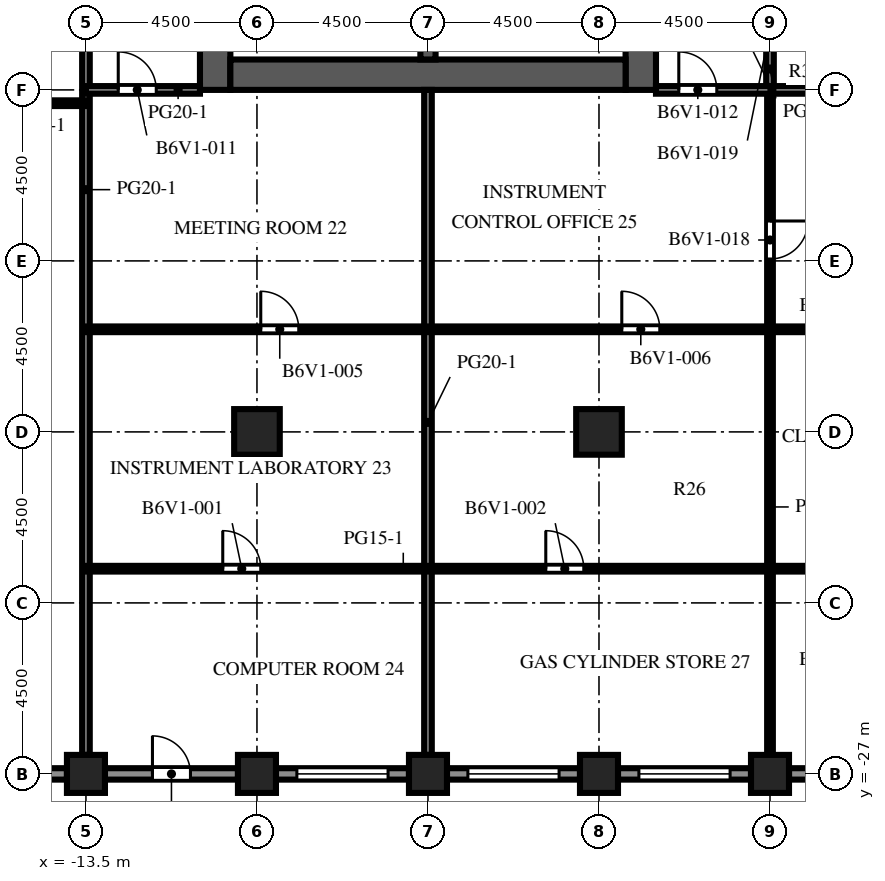
"""IFC4 building model, lengths in metres.
Left out: names, types, materials, properties, quantities, classifications, styles, units other than length and angle.
Written with IfcOpenShell. Run it as: python <this file> out.ifc"""

import sys

from ifc_helpers import new_model, si_unit, direction, frame, frame_2d, origin, origin_2d, place, context, subcontext, project, spatial, rectangle, extrude, element, fill, save


model = new_model("IFC4")
c1 = context("Model", 3, precision=1e-05, world=origin(), true_north=direction((0.0, 1.0)))
c2 = subcontext(c1, "Body", "Model", "MODEL_VIEW")
j1 = project(units=[si_unit("LENGTHUNIT", "METRE"), si_unit("PLANEANGLEUNIT", "RADIAN")], contexts=[c1])
p1 = place(None, origin())
s1 = spatial("IfcSite", under=j1, at=p1, CompositionType="ELEMENT")
p2 = place(p1, origin())
s2 = spatial("IfcBuilding", under=s1, at=p2, CompositionType="ELEMENT")
p3 = place(p2, frame((0.0, 0.0, 212.0)))
s3 = spatial("IfcBuildingStorey", under=s2, at=p3, CompositionType="ELEMENT", Elevation=212.0)
for number, where, z_axis, x_axis in (
    (1, (-13.5, -27.0, 0.0), (0.0, 0.0, 1.0), (1.0, 0.0, 0.0)),
    (2, (-9.0, -27.0, 0.0), (0.0, 0.0, 1.0), (1.0, 0.0, 0.0)),
    (3, (-4.5, -27.0, 0.0), (0.0, 0.0, 1.0), (1.0, 0.0, 0.0)),
    (4, (0.0, -27.0, 0.0), (0.0, 0.0, 1.0), (1.0, 0.0, 0.0)),
    (5, (4.5, -27.0, 0.0), (0.0, 0.0, 1.0), (1.0, 0.0, 0.0)),
):
    element("IfcColumn", number, at=place(p3, frame(where, z_axis=z_axis, x_axis=x_axis)), inside=s3, PredefinedType="COLUMN", context=c2, shape_type="SweptSolid", body=[
        extrude(rectangle(XDim=1.0, YDim=1.0, at=origin_2d()), origin(), (0.0, 0.0, 1.0), 4.1),
    ])
for number, where, z_axis, x_axis in (
    (6, (-9.0, -18.0, 0.0), (0.0, 0.0, 1.0), (1.0, 0.0, 0.0)),
    (7, (0.0, -18.0, 0.0), (0.0, 0.0, 1.0), (1.0, 0.0, 0.0)),
):
    element("IfcColumn", number, at=place(p3, frame(where, z_axis=z_axis, x_axis=x_axis)), inside=s3, PredefinedType="COLUMN", context=c2, shape_type="SweptSolid", body=[
        extrude(rectangle(XDim=1.2, YDim=1.2, at=origin_2d()), origin(), (0.0, 0.0, 1.0), 4.1),
    ])
p4 = place(p3, frame((-10.1, -9.0, 0.0), z_axis=(0.0, 0.0, 1.0), x_axis=(0.0, 1.0, 0.0)))
e8 = element("IfcWall", 8, at=p4, inside=s3, PredefinedType="SHEAR", context=c2, shape_type="SweptSolid", body=[
    extrude(rectangle(XDim=27.5, YDim=0.8, at=frame_2d((13.75, 0.0))), origin(), (0.0, 0.0, 1.0), 4.1),
])
p5 = place(p4, frame((12.55, 0.0, 0.0)))
e9 = element("IfcOpeningElement", 9, at=p5, cuts=e8, PredefinedType="OPENING", context=c2, shape_type="SweptSolid", body=[
    extrude(rectangle(XDim=2.4, YDim=2.4, at=frame_2d((1.2, 1.2))), frame((0.0, 0.41, 0.0), z_axis=(0.0, -1.0, 0.0), x_axis=(1.0, 0.0, 0.0)), (0.0, 0.0, 1.0), 0.82),
])
p6 = place(p4, frame((6.825, 0.0, 0.0)))
e10 = element("IfcOpeningElement", 10, at=p6, cuts=e8, PredefinedType="OPENING", context=c2, shape_type="SweptSolid", body=[
    extrude(rectangle(XDim=1.2, YDim=2.1, at=frame_2d((0.6, 1.05))), frame((0.0, 0.41, 0.0), z_axis=(0.0, -1.0, 0.0), x_axis=(1.0, 0.0, 0.0)), (0.0, 0.0, 1.0), 0.82),
])
p7 = place(p4, frame((19.475, 0.0, 0.0)))
e11 = element("IfcOpeningElement", 11, at=p7, cuts=e8, PredefinedType="OPENING", context=c2, shape_type="SweptSolid", body=[
    extrude(rectangle(XDim=1.2, YDim=2.1, at=frame_2d((0.6, 1.05))), frame((0.0, 0.41, 0.0), z_axis=(0.0, -1.0, 0.0), x_axis=(1.0, 0.0, 0.0)), (0.0, 0.0, 1.0), 0.82),
])
p8 = place(p3, frame((1.1, -9.0, 0.0), z_axis=(0.0, 0.0, 1.0), x_axis=(0.0, 1.0, 0.0)))
e12 = element("IfcWall", 12, at=p8, inside=s3, PredefinedType="SHEAR", context=c2, shape_type="SweptSolid", body=[
    extrude(rectangle(XDim=27.5, YDim=0.8, at=frame_2d((13.75, 0.0))), origin(), (0.0, 0.0, 1.0), 4.1),
])
p9 = place(p8, frame((12.55, 0.0, 0.0)))
e13 = element("IfcOpeningElement", 13, at=p9, cuts=e12, PredefinedType="OPENING", context=c2, shape_type="SweptSolid", body=[
    extrude(rectangle(XDim=2.4, YDim=2.4, at=frame_2d((1.2, 1.2))), frame((0.0, 0.41, 0.0), z_axis=(0.0, -1.0, 0.0), x_axis=(1.0, 0.0, 0.0)), (0.0, 0.0, 1.0), 0.82),
])
p10 = place(p8, frame((3.95, 0.0, 0.0)))
e14 = element("IfcOpeningElement", 14, at=p10, cuts=e12, PredefinedType="OPENING", context=c2, shape_type="SweptSolid", body=[
    extrude(rectangle(XDim=1.2, YDim=2.1, at=frame_2d((0.6, 1.05))), frame((0.0, 0.41, 0.0), z_axis=(0.0, -1.0, 0.0), x_axis=(1.0, 0.0, 0.0)), (0.0, 0.0, 1.0), 0.82),
])
p11 = place(p8, frame((22.35, 0.0, 0.0)))
e15 = element("IfcOpeningElement", 15, at=p11, cuts=e12, PredefinedType="OPENING", context=c2, shape_type="SweptSolid", body=[
    extrude(rectangle(XDim=1.2, YDim=2.1, at=frame_2d((0.6, 1.05))), frame((0.0, 0.41, 0.0), z_axis=(0.0, -1.0, 0.0), x_axis=(1.0, 0.0, 0.0)), (0.0, 0.0, 1.0), 0.82),
])
p12 = place(p3, frame((-9.7, -8.6, 0.0), z_axis=(0.0, 0.0, 1.0), x_axis=(1.0, 0.0, 0.0)))
e16 = element("IfcWall", 16, at=p12, inside=s3, PredefinedType="SHEAR", context=c2, shape_type="SweptSolid", body=[
    extrude(rectangle(XDim=10.4, YDim=0.8, at=frame_2d((5.2, 0.0))), origin(), (0.0, 0.0, 1.0), 4.1),
])
p13 = place(p3, frame((-4.5, -8.2, 0.0), z_axis=(0.0, 0.0, 1.0), x_axis=(0.0, 1.0, 0.0)))
e17 = element("IfcWall", 17, at=p13, inside=s3, PredefinedType="SHEAR", context=c2, shape_type="SweptSolid", body=[
    extrude(rectangle(XDim=7.5, YDim=0.4, at=frame_2d((3.75, 0.0))), origin(), (0.0, 0.0, 1.0), 4.1),
])
p14 = place(p3, frame((-14.0, -27.0, 0.0), z_axis=(0.0, 0.0, 1.0), x_axis=(-1.0, 0.0, 0.0)))
e18 = element("IfcWall", 18, at=p14, inside=s3, PredefinedType="SOLIDWALL", context=c2, shape_type="SweptSolid", body=[
    extrude(rectangle(XDim=3.5, YDim=0.3, at=frame_2d((1.75, 0.0))), origin(), (0.0, 0.0, 1.0), 2.85),
])
p15 = place(p14, frame((0.55, 0.0, 0.8)))
e19 = element("IfcOpeningElement", 19, at=p15, cuts=e18, PredefinedType="OPENING", context=c2, shape_type="SweptSolid", body=[
    extrude(rectangle(XDim=2.4, YDim=1.7, at=frame_2d((1.2, 0.85))), frame((0.0, 0.16, 0.0), z_axis=(0.0, -1.0, 0.0), x_axis=(1.0, 0.0, 0.0)), (0.0, 0.0, 1.0), 0.32),
])
p16 = place(p3, frame((-9.5, -27.0, 0.0), z_axis=(0.0, 0.0, 1.0), x_axis=(-1.0, 0.0, 0.0)))
e20 = element("IfcWall", 20, at=p16, inside=s3, PredefinedType="SOLIDWALL", context=c2, shape_type="SweptSolid", body=[
    extrude(rectangle(XDim=3.5, YDim=0.3, at=frame_2d((1.75, 0.0))), origin(), (0.0, 0.0, 1.0), 2.85),
])
p17 = place(p16, frame((1.25, 0.0, 0.0)))
e21 = element("IfcOpeningElement", 21, at=p17, cuts=e20, PredefinedType="OPENING", context=c2, shape_type="SweptSolid", body=[
    extrude(rectangle(XDim=1.0, YDim=2.2, at=frame_2d((0.5, 1.1))), frame((0.0, 0.16, 0.0), z_axis=(0.0, -1.0, 0.0), x_axis=(1.0, 0.0, 0.0)), (0.0, 0.0, 1.0), 0.32),
])
p18 = place(p3, frame((-5.0, -27.0, 0.0), z_axis=(0.0, 0.0, 1.0), x_axis=(-1.0, 0.0, 0.0)))
e22 = element("IfcWall", 22, at=p18, inside=s3, PredefinedType="SOLIDWALL", context=c2, shape_type="SweptSolid", body=[
    extrude(rectangle(XDim=3.5, YDim=0.3, at=frame_2d((1.75, 0.0))), origin(), (0.0, 0.0, 1.0), 2.85),
])
p19 = place(p18, frame((0.55, 0.0, 0.8)))
e23 = element("IfcOpeningElement", 23, at=p19, cuts=e22, PredefinedType="OPENING", context=c2, shape_type="SweptSolid", body=[
    extrude(rectangle(XDim=2.4, YDim=1.7, at=frame_2d((1.2, 0.85))), frame((0.0, 0.16, 0.0), z_axis=(0.0, -1.0, 0.0), x_axis=(1.0, 0.0, 0.0)), (0.0, 0.0, 1.0), 0.32),
])
p20 = place(p3, frame((-0.5, -27.0, 0.0), z_axis=(0.0, 0.0, 1.0), x_axis=(-1.0, 0.0, 0.0)))
e24 = element("IfcWall", 24, at=p20, inside=s3, PredefinedType="SOLIDWALL", context=c2, shape_type="SweptSolid", body=[
    extrude(rectangle(XDim=3.5, YDim=0.3, at=frame_2d((1.75, 0.0))), origin(), (0.0, 0.0, 1.0), 2.85),
])
p21 = place(p20, frame((0.55, 0.0, 0.8)))
e25 = element("IfcOpeningElement", 25, at=p21, cuts=e24, PredefinedType="OPENING", context=c2, shape_type="SweptSolid", body=[
    extrude(rectangle(XDim=2.4, YDim=1.7, at=frame_2d((1.2, 0.85))), frame((0.0, 0.16, 0.0), z_axis=(0.0, -1.0, 0.0), x_axis=(1.0, 0.0, 0.0)), (0.0, 0.0, 1.0), 0.32),
])
p22 = place(p3, frame((4.0, -27.0, 0.0), z_axis=(0.0, 0.0, 1.0), x_axis=(-1.0, 0.0, 0.0)))
e26 = element("IfcWall", 26, at=p22, inside=s3, PredefinedType="SOLIDWALL", context=c2, shape_type="SweptSolid", body=[
    extrude(rectangle(XDim=3.5, YDim=0.3, at=frame_2d((1.75, 0.0))), origin(), (0.0, 0.0, 1.0), 2.85),
])
p23 = place(p22, frame((0.55, 0.0, 0.8)))
e27 = element("IfcOpeningElement", 27, at=p23, cuts=e26, PredefinedType="OPENING", context=c2, shape_type="SweptSolid", body=[
    extrude(rectangle(XDim=2.4, YDim=1.7, at=frame_2d((1.2, 0.85))), frame((0.0, 0.16, 0.0), z_axis=(0.0, -1.0, 0.0), x_axis=(1.0, 0.0, 0.0)), (0.0, 0.0, 1.0), 0.32),
])
p24 = place(p3, frame((8.5, -27.0, 0.0), z_axis=(0.0, 0.0, 1.0), x_axis=(-1.0, 0.0, 0.0)))
e28 = element("IfcWall", 28, at=p24, inside=s3, PredefinedType="SOLIDWALL", context=c2, shape_type="SweptSolid", body=[
    extrude(rectangle(XDim=3.5, YDim=0.3, at=frame_2d((1.75, 0.0))), origin(), (0.0, 0.0, 1.0), 2.85),
])
p25 = place(p24, frame((0.55, 0.0, 0.8)))
e29 = element("IfcOpeningElement", 29, at=p25, cuts=e28, PredefinedType="OPENING", context=c2, shape_type="SweptSolid", body=[
    extrude(rectangle(XDim=2.4, YDim=1.7, at=frame_2d((1.2, 0.85))), frame((0.0, 0.16, 0.0), z_axis=(0.0, -1.0, 0.0), x_axis=(1.0, 0.0, 0.0)), (0.0, 0.0, 1.0), 0.32),
])
p26 = place(p3, frame((-0.8, -8.2, 0.0), z_axis=(0.0, 0.0, 1.0), x_axis=(0.0, 1.0, 0.0)))
e30 = element("IfcWall", 30, at=p26, inside=s3, PredefinedType="PARTITIONING", context=c2, shape_type="SweptSolid", body=[
    extrude(rectangle(XDim=2.25, YDim=0.1, at=frame_2d((1.125, 0.0))), origin(), (0.0, 0.0, 1.0), 3.65),
])
p27 = place(p26, frame((0.625, 0.0, 0.0)))
e31 = element("IfcOpeningElement", 31, at=p27, cuts=e30, PredefinedType="OPENING", context=c2, shape_type="SweptSolid", body=[
    extrude(rectangle(XDim=1.0, YDim=2.1, at=frame_2d((0.5, 1.05))), frame((0.0, 0.06, 0.0), z_axis=(0.0, -1.0, 0.0), x_axis=(1.0, 0.0, 0.0)), (0.0, 0.0, 1.0), 0.12),
])
p28 = place(p3, frame((-13.5, -26.5, 0.0), z_axis=(0.0, 0.0, 1.0), x_axis=(0.0, 1.0, 0.0)))
e32 = element("IfcWall", 32, at=p28, inside=s3, PredefinedType="PARTITIONING", context=c2, shape_type="SweptSolid", body=[
    extrude(rectangle(XDim=29.75, YDim=0.2, at=frame_2d((14.875, 0.0))), origin(), (0.0, 0.0, 1.0), 3.65),
])
p29 = place(p3, frame((-4.5, -26.5, 0.0), z_axis=(0.0, 0.0, 1.0), x_axis=(0.0, 1.0, 0.0)))
e33 = element("IfcWall", 33, at=p29, inside=s3, PredefinedType="PARTITIONING", context=c2, shape_type="SweptSolid", body=[
    extrude(rectangle(XDim=17.5, YDim=0.2, at=frame_2d((8.75, 0.0))), origin(), (0.0, 0.0, 1.0), 3.65),
])
p30 = place(p3, frame((4.5, -9.0, 0.0), z_axis=(0.0, 0.0, 1.0), x_axis=(0.0, -1.0, 0.0)))
e34 = element("IfcWall", 34, at=p30, inside=s3, PredefinedType="PARTITIONING", context=c2, shape_type="SweptSolid", body=[
    extrude(rectangle(XDim=17.5, YDim=0.15, at=frame_2d((8.75, 0.0))), origin(), (0.0, 0.0, 1.0), 3.65),
])
p31 = place(p30, frame((3.45, 0.0, 0.0)))
e35 = element("IfcOpeningElement", 35, at=p31, cuts=e34, PredefinedType="OPENING", context=c2, shape_type="SweptSolid", body=[
    extrude(rectangle(XDim=1.0, YDim=2.1, at=frame_2d((0.5, 1.05))), frame((0.0, 0.085, 0.0), z_axis=(0.0, -1.0, 0.0), x_axis=(1.0, 0.0, 0.0)), (0.0, 0.0, 1.0), 0.17),
])
p32 = place(p3, frame((4.5, -6.0, 0.0), z_axis=(0.0, 0.0, 1.0), x_axis=(0.0, -1.0, 0.0)))
e36 = element("IfcWall", 36, at=p32, inside=s3, PredefinedType="PARTITIONING", context=c2, shape_type="SweptSolid", body=[
    extrude(rectangle(XDim=3.0, YDim=0.2, at=frame_2d((1.5, 0.0))), origin(), (0.0, 0.0, 1.0), 3.65),
])
p33 = place(p32, frame((0.9, 0.0, 0.0)))
e37 = element("IfcOpeningElement", 37, at=p33, cuts=e36, PredefinedType="OPENING", context=c2, shape_type="SweptSolid", body=[
    extrude(rectangle(XDim=1.0, YDim=2.1, at=frame_2d((0.5, 1.05))), frame((0.0, 0.11, 0.0), z_axis=(0.0, -1.0, 0.0), x_axis=(1.0, 0.0, 0.0)), (0.0, 0.0, 1.0), 0.22),
])
p34 = place(p3, frame((21.0, -21.6, 0.0), z_axis=(0.0, 0.0, 1.0), x_axis=(-1.0, 0.0, 0.0)))
e38 = element("IfcWall", 38, at=p34, inside=s3, PredefinedType="PARTITIONING", context=c2, shape_type="SweptSolid", body=[
    extrude(rectangle(XDim=34.5, YDim=0.15, at=frame_2d((17.25, 0.0))), origin(), (0.0, 0.0, 1.0), 3.65),
])
p35 = place(p34, frame((29.9, 0.0, 0.0)))
e39 = element("IfcOpeningElement", 39, at=p35, cuts=e38, PredefinedType="OPENING", context=c2, shape_type="SweptSolid", body=[
    extrude(rectangle(XDim=1.0, YDim=2.1, at=frame_2d((0.5, 1.05))), frame((0.0, 0.085, 0.0), z_axis=(0.0, -1.0, 0.0), x_axis=(1.0, 0.0, 0.0)), (0.0, 0.0, 1.0), 0.17),
])
p36 = place(p34, frame((21.4, 0.0, 0.0)))
e40 = element("IfcOpeningElement", 40, at=p36, cuts=e38, PredefinedType="OPENING", context=c2, shape_type="SweptSolid", body=[
    extrude(rectangle(XDim=1.0, YDim=2.1, at=frame_2d((0.5, 1.05))), frame((0.0, 0.085, 0.0), z_axis=(0.0, -1.0, 0.0), x_axis=(1.0, 0.0, 0.0)), (0.0, 0.0, 1.0), 0.17),
])
p37 = place(p34, frame((13.15, 0.0, 0.0)))
e41 = element("IfcOpeningElement", 41, at=p37, cuts=e38, PredefinedType="OPENING", context=c2, shape_type="SweptSolid", body=[
    extrude(rectangle(XDim=1.0, YDim=2.1, at=frame_2d((0.5, 1.05))), frame((0.0, 0.085, 0.0), z_axis=(0.0, -1.0, 0.0), x_axis=(1.0, 0.0, 0.0)), (0.0, 0.0, 1.0), 0.17),
])
p38 = place(p34, frame((5.15, 0.0, 0.0)))
e42 = element("IfcOpeningElement", 42, at=p38, cuts=e38, PredefinedType="OPENING", context=c2, shape_type="SweptSolid", body=[
    extrude(rectangle(XDim=1.0, YDim=2.1, at=frame_2d((0.5, 1.05))), frame((0.0, 0.085, 0.0), z_axis=(0.0, -1.0, 0.0), x_axis=(1.0, 0.0, 0.0)), (0.0, 0.0, 1.0), 0.17),
])
p39 = place(p3, frame((21.0, -15.3, 0.0), z_axis=(0.0, 0.0, 1.0), x_axis=(-1.0, 0.0, 0.0)))
e43 = element("IfcWall", 43, at=p39, inside=s3, PredefinedType="PARTITIONING", context=c2, shape_type="SweptSolid", body=[
    extrude(rectangle(XDim=34.5, YDim=0.15, at=frame_2d((17.25, 0.0))), origin(), (0.0, 0.0, 1.0), 3.65),
])
p40 = place(p39, frame((28.9, 0.0, 0.0)))
e44 = element("IfcOpeningElement", 44, at=p40, cuts=e43, PredefinedType="OPENING", context=c2, shape_type="SweptSolid", body=[
    extrude(rectangle(XDim=1.0, YDim=2.1, at=frame_2d((0.5, 1.05))), frame((0.0, 0.085, 0.0), z_axis=(0.0, -1.0, 0.0), x_axis=(1.0, 0.0, 0.0)), (0.0, 0.0, 1.0), 0.17),
])
p41 = place(p39, frame((19.4, 0.0, 0.0)))
e45 = element("IfcOpeningElement", 45, at=p41, cuts=e43, PredefinedType="OPENING", context=c2, shape_type="SweptSolid", body=[
    extrude(rectangle(XDim=1.0, YDim=2.1, at=frame_2d((0.5, 1.05))), frame((0.0, 0.085, 0.0), z_axis=(0.0, -1.0, 0.0), x_axis=(1.0, 0.0, 0.0)), (0.0, 0.0, 1.0), 0.17),
])
p42 = place(p39, frame((14.15, 0.0, 0.0)))
e46 = element("IfcOpeningElement", 46, at=p42, cuts=e43, PredefinedType="OPENING", context=c2, shape_type="SweptSolid", body=[
    extrude(rectangle(XDim=1.0, YDim=2.1, at=frame_2d((0.5, 1.05))), frame((0.0, 0.085, 0.0), z_axis=(0.0, -1.0, 0.0), x_axis=(1.0, 0.0, 0.0)), (0.0, 0.0, 1.0), 0.17),
])
p43 = place(p39, frame((3.9, 0.0, 0.0)))
e47 = element("IfcOpeningElement", 47, at=p43, cuts=e43, PredefinedType="OPENING", context=c2, shape_type="SweptSolid", body=[
    extrude(rectangle(XDim=1.0, YDim=2.1, at=frame_2d((0.5, 1.05))), frame((0.0, 0.085, 0.0), z_axis=(0.0, -1.0, 0.0), x_axis=(1.0, 0.0, 0.0)), (0.0, 0.0, 1.0), 0.17),
])
p44 = place(p3, frame((-13.5, -9.35, 0.0), z_axis=(0.0, 0.0, 1.0), x_axis=(-1.0, 0.0, 0.0)))
e48 = element("IfcWall", 48, at=p44, inside=s3, PredefinedType="PARTITIONING", context=c2, shape_type="SweptSolid", body=[
    extrude(rectangle(XDim=3.9, YDim=0.15, at=frame_2d((1.95, 0.0))), origin(), (0.0, 0.0, 1.0), 3.65),
])
p45 = place(p44, frame((2.65, 0.0, 0.0)))
e49 = element("IfcOpeningElement", 49, at=p45, cuts=e48, PredefinedType="OPENING", context=c2, shape_type="SweptSolid", body=[
    extrude(rectangle(XDim=1.0, YDim=2.1, at=frame_2d((0.5, 1.05))), frame((0.0, 0.085, 0.0), z_axis=(0.0, -1.0, 0.0), x_axis=(1.0, 0.0, 0.0)), (0.0, 0.0, 1.0), 0.17),
])
p46 = place(p3, frame((-10.5, -9.0, 0.0), z_axis=(0.0, 0.0, 1.0), x_axis=(-1.0, 0.0, 0.0)))
e50 = element("IfcWall", 50, at=p46, inside=s3, PredefinedType="PARTITIONING", context=c2, shape_type="SweptSolid", body=[
    extrude(rectangle(XDim=3.0, YDim=0.2, at=frame_2d((1.5, 0.0))), origin(), (0.0, 0.0, 1.0), 3.65),
])
p47 = place(p46, frame((1.15, 0.0, 0.0)))
e51 = element("IfcOpeningElement", 51, at=p47, cuts=e50, PredefinedType="OPENING", context=c2, shape_type="SweptSolid", body=[
    extrude(rectangle(XDim=1.0, YDim=2.1, at=frame_2d((0.5, 1.05))), frame((0.0, 0.11, 0.0), z_axis=(0.0, -1.0, 0.0), x_axis=(1.0, 0.0, 0.0)), (0.0, 0.0, 1.0), 0.22),
])
p48 = place(p3, frame((6.0, -9.0, 0.0), z_axis=(0.0, 0.0, 1.0), x_axis=(-1.0, 0.0, 0.0)))
e52 = element("IfcWall", 52, at=p48, inside=s3, PredefinedType="PARTITIONING", context=c2, shape_type="SweptSolid", body=[
    extrude(rectangle(XDim=4.5, YDim=0.2, at=frame_2d((2.25, 0.0))), origin(), (0.0, 0.0, 1.0), 3.65),
])
p49 = place(p48, frame((2.9, 0.0, 0.0)))
e53 = element("IfcOpeningElement", 53, at=p49, cuts=e52, PredefinedType="OPENING", context=c2, shape_type="SweptSolid", body=[
    extrude(rectangle(XDim=1.0, YDim=2.1, at=frame_2d((0.5, 1.05))), frame((0.0, 0.11, 0.0), z_axis=(0.0, -1.0, 0.0), x_axis=(1.0, 0.0, 0.0)), (0.0, 0.0, 1.0), 0.22),
])
p50 = place(p17, origin())
e54 = element("IfcDoor", 54, at=p50, inside=s3, OperationType="SINGLE_SWING_RIGHT", PredefinedType="DOOR", context=c2, shape_type="SweptSolid", body=[
    extrude(rectangle(XDim=1.0, YDim=2.2, at=frame_2d((0.5, 1.1))), frame((0.0, 0.025, 0.0), z_axis=(0.0, -1.0, 0.0), x_axis=(1.0, 0.0, 0.0)), (0.0, 0.0, 1.0), 0.05),
])
fill(e21, e54)
p51 = place(p19, origin())
e55 = element("IfcWindow", 55, at=p51, inside=s3, PartitioningType="SINGLE_PANEL", PredefinedType="WINDOW", context=c2, shape_type="SweptSolid", body=[
    extrude(rectangle(XDim=2.4, YDim=1.7, at=frame_2d((1.2, 0.85))), frame((0.0, 0.03, 0.0), z_axis=(0.0, -1.0, 0.0), x_axis=(1.0, 0.0, 0.0)), (0.0, 0.0, 1.0), 0.06),
])
fill(e23, e55)
p52 = place(p21, origin())
e56 = element("IfcWindow", 56, at=p52, inside=s3, PartitioningType="SINGLE_PANEL", PredefinedType="WINDOW", context=c2, shape_type="SweptSolid", body=[
    extrude(rectangle(XDim=2.4, YDim=1.7, at=frame_2d((1.2, 0.85))), frame((0.0, 0.03, 0.0), z_axis=(0.0, -1.0, 0.0), x_axis=(1.0, 0.0, 0.0)), (0.0, 0.0, 1.0), 0.06),
])
fill(e25, e56)
p53 = place(p23, origin())
e57 = element("IfcWindow", 57, at=p53, inside=s3, PartitioningType="SINGLE_PANEL", PredefinedType="WINDOW", context=c2, shape_type="SweptSolid", body=[
    extrude(rectangle(XDim=2.4, YDim=1.7, at=frame_2d((1.2, 0.85))), frame((0.0, 0.03, 0.0), z_axis=(0.0, -1.0, 0.0), x_axis=(1.0, 0.0, 0.0)), (0.0, 0.0, 1.0), 0.06),
])
fill(e27, e57)
p54 = place(p35, origin())
e58 = element("IfcDoor", 58, at=p54, inside=s3, OperationType="SINGLE_SWING_RIGHT", PredefinedType="DOOR", context=c2, shape_type="SweptSolid", body=[
    extrude(rectangle(XDim=1.0, YDim=2.1, at=frame_2d((0.5, 1.05))), frame((0.0, 0.025, 0.0), z_axis=(0.0, -1.0, 0.0), x_axis=(1.0, 0.0, 0.0)), (0.0, 0.0, 1.0), 0.05),
])
fill(e39, e58)
p55 = place(p36, origin())
e59 = element("IfcDoor", 59, at=p55, inside=s3, OperationType="SINGLE_SWING_RIGHT", PredefinedType="DOOR", context=c2, shape_type="SweptSolid", body=[
    extrude(rectangle(XDim=1.0, YDim=2.1, at=frame_2d((0.5, 1.05))), frame((0.0, 0.025, 0.0), z_axis=(0.0, -1.0, 0.0), x_axis=(1.0, 0.0, 0.0)), (0.0, 0.0, 1.0), 0.05),
])
fill(e40, e59)
p56 = place(p40, origin())
e60 = element("IfcDoor", 60, at=p56, inside=s3, OperationType="SINGLE_SWING_RIGHT", PredefinedType="DOOR", context=c2, shape_type="SweptSolid", body=[
    extrude(rectangle(XDim=1.0, YDim=2.1, at=frame_2d((0.5, 1.05))), frame((0.0, 0.025, 0.0), z_axis=(0.0, -1.0, 0.0), x_axis=(1.0, 0.0, 0.0)), (0.0, 0.0, 1.0), 0.05),
])
fill(e44, e60)
p57 = place(p41, origin())
e61 = element("IfcDoor", 61, at=p57, inside=s3, OperationType="SINGLE_SWING_RIGHT", PredefinedType="DOOR", context=c2, shape_type="SweptSolid", body=[
    extrude(rectangle(XDim=1.0, YDim=2.1, at=frame_2d((0.5, 1.05))), frame((0.0, 0.025, 0.0), z_axis=(0.0, -1.0, 0.0), x_axis=(1.0, 0.0, 0.0)), (0.0, 0.0, 1.0), 0.05),
])
fill(e45, e61)
p58 = place(p47, origin())
e62 = element("IfcDoor", 62, at=p58, inside=s3, OperationType="SINGLE_SWING_RIGHT", PredefinedType="DOOR", context=c2, shape_type="SweptSolid", body=[
    extrude(rectangle(XDim=1.0, YDim=2.1, at=frame_2d((0.5, 1.05))), frame((0.0, 0.025, 0.0), z_axis=(0.0, -1.0, 0.0), x_axis=(1.0, 0.0, 0.0)), (0.0, 0.0, 1.0), 0.05),
])
fill(e51, e62)
p59 = place(p49, origin())
e63 = element("IfcDoor", 63, at=p59, inside=s3, OperationType="SINGLE_SWING_RIGHT", PredefinedType="DOOR", context=c2, shape_type="SweptSolid", body=[
    extrude(rectangle(XDim=1.0, YDim=2.1, at=frame_2d((0.5, 1.05))), frame((0.0, 0.025, 0.0), z_axis=(0.0, -1.0, 0.0), x_axis=(1.0, 0.0, 0.0)), (0.0, 0.0, 1.0), 0.05),
])
fill(e53, e63)
p60 = place(p31, origin())
e64 = element("IfcDoor", 64, at=p60, inside=s3, OperationType="SINGLE_SWING_LEFT", PredefinedType="DOOR", context=c2, shape_type="SweptSolid", body=[
    extrude(rectangle(XDim=1.0, YDim=2.1, at=frame_2d((0.5, 1.05))), frame((0.0, 0.025, 0.0), z_axis=(0.0, -1.0, 0.0), x_axis=(1.0, 0.0, 0.0)), (0.0, 0.0, 1.0), 0.05),
])
fill(e35, e64)
save(model, sys.argv[1])
